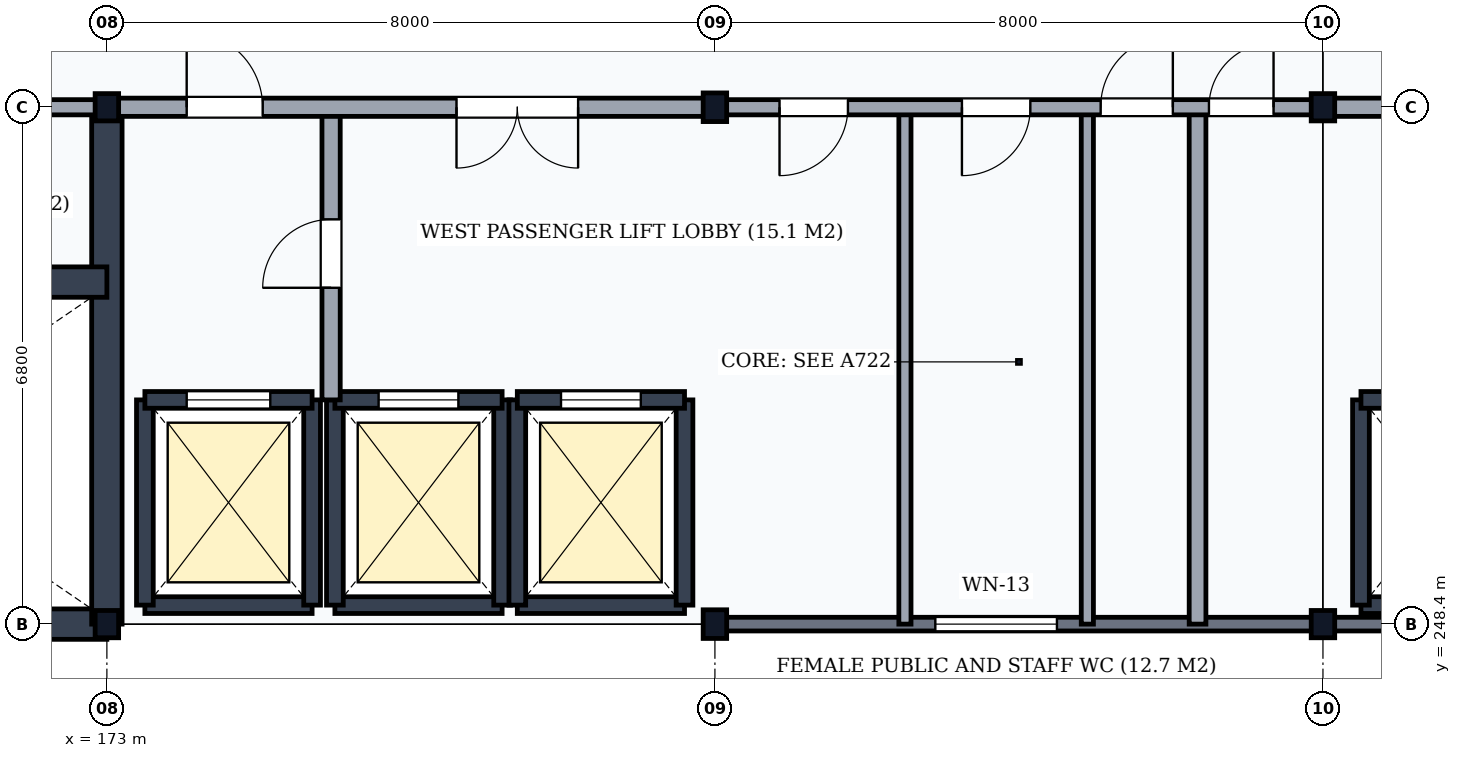
"""IFC4 building model, lengths in metres.
Left out: names, types, materials, properties, quantities, classifications, styles, units other than length and angle.
Written with IfcOpenShell. Run it as: python <this file> out.ifc"""

import sys

from ifc_helpers import new_model, si_unit, direction, frame, frame_2d, origin, origin_2d, place, context, subcontext, project, spatial, rectangle, i_section, extrude, element, fill, save


model = new_model("IFC4")
c1 = context("Model", 3, precision=1e-05, world=origin(), true_north=direction((0.0, 1.0)))
c2 = subcontext(c1, "Body", "Model", "MODEL_VIEW")
j1 = project(units=[si_unit("LENGTHUNIT", "METRE"), si_unit("PLANEANGLEUNIT", "RADIAN")], contexts=[c1])
p1 = place(None, origin())
s1 = spatial("IfcSite", under=j1, at=p1, CompositionType="ELEMENT")
p2 = place(p1, origin())
s2 = spatial("IfcBuilding", under=s1, at=p2, CompositionType="ELEMENT")
p3 = place(p2, frame((0.0, 0.0, 47.7)))
s3 = spatial("IfcBuildingStorey", under=s2, at=p3, CompositionType="ELEMENT", Elevation=47.7)
for number, where, z_axis, x_axis in (
    (1, (173.0, 248.4, 0.0), (0.0, 0.0, 1.0), (1.0, 0.0, 0.0)),
    (2, (173.0, 255.2, 0.0), (0.0, 0.0, 1.0), (1.0, 0.0, 0.0)),
):
    element("IfcColumn", number, at=place(p3, frame(where, z_axis=z_axis, x_axis=x_axis)), inside=s3, PredefinedType="COLUMN", context=c2, shape_type="SweptSolid", body=[
        extrude(i_section(OverallWidth=0.309, OverallDepth=0.359, WebThickness=0.021, FlangeThickness=0.04, FilletRadius=0.027, at=origin_2d()), origin(), (0.0, 0.0, 1.0), 3.9),
    ])
for number, where, z_axis, x_axis in (
    (3, (181.0, 248.4, 0.0), (0.0, 0.0, 1.0), (1.0, 0.0, 0.0)),
    (4, (181.0, 255.2, 0.0), (0.0, 0.0, 1.0), (1.0, 0.0, 0.0)),
):
    element("IfcColumn", number, at=place(p3, frame(where, z_axis=z_axis, x_axis=x_axis)), inside=s3, PredefinedType="COLUMN", context=c2, shape_type="SweptSolid", body=[
        extrude(i_section(OverallWidth=0.309, OverallDepth=0.377, WebThickness=0.021, FlangeThickness=0.04, FilletRadius=0.027, at=origin_2d()), origin(), (0.0, 0.0, 1.0), 3.9),
    ])
for number, where, z_axis, x_axis in (
    (5, (189.0, 248.4, 0.0), (0.0, 0.0, 1.0), (1.0, 0.0, 0.0)),
    (6, (189.0, 255.2, 0.0), (0.0, 0.0, 1.0), (1.0, 0.0, 0.0)),
):
    element("IfcColumn", number, at=place(p3, frame(where, z_axis=z_axis, x_axis=x_axis)), inside=s3, PredefinedType="COLUMN", context=c2, shape_type="SweptSolid", body=[
        extrude(i_section(OverallWidth=0.309, OverallDepth=0.359, WebThickness=0.021, FlangeThickness=0.04, FilletRadius=0.027, at=origin_2d()), origin(), (0.0, 0.0, 1.0), 3.9),
    ])
p4 = place(p3, frame((181.006, 248.4, 0.0), z_axis=(0.0, 0.0, 1.0), x_axis=(1.0, 0.0, 0.0)))
e7 = element("IfcWall", 7, at=p4, inside=s3, PredefinedType="SOLIDWALL", context=c2, shape_type="SweptSolid", body=[
    extrude(rectangle(XDim=7.988, YDim=0.18, at=frame_2d((3.994, 0.0))), origin(), (0.0, 0.0, 1.0), 3.298),
])
p5 = place(p4, frame((2.894, 0.0, 0.95)))
e8 = element("IfcOpeningElement", 8, at=p5, cuts=e7, PredefinedType="OPENING", context=c2, shape_type="SweptSolid", body=[
    extrude(rectangle(XDim=1.6, YDim=2.0, at=frame_2d((0.8, 1.0))), frame((0.0, 0.105, 0.0), z_axis=(0.0, -1.0, 0.0), x_axis=(1.0, 0.0, 0.0)), (0.0, 0.0, 1.0), 0.21),
])
p6 = place(p3, frame((189.006, 248.4, 0.0), z_axis=(0.0, 0.0, 1.0), x_axis=(1.0, 0.0, 0.0)))
e9 = element("IfcWall", 9, at=p6, inside=s3, PredefinedType="SOLIDWALL", context=c2, shape_type="SweptSolid", body=[
    extrude(rectangle(XDim=7.988, YDim=0.18, at=frame_2d((3.994, 0.0))), origin(), (0.0, 0.0, 1.0), 3.298),
])
p7 = place(p3, frame((165.0, 248.4, 0.0), z_axis=(0.0, 0.0, 1.0), x_axis=(1.0, 0.0, 0.0)))
e10 = element("IfcWall", 10, at=p7, inside=s3, PredefinedType="SHEAR", context=c2, shape_type="SweptSolid", body=[
    extrude(rectangle(XDim=8.0, YDim=0.4, at=frame_2d((4.0, 0.0))), origin(), (0.0, 0.0, 1.0), 3.61),
])
p8 = place(p3, frame((173.0, 248.4, 0.0), z_axis=(0.0, 0.0, 1.0), x_axis=(0.0, 1.0, 0.0)))
e11 = element("IfcWall", 11, at=p8, inside=s3, PredefinedType="SHEAR", context=c2, shape_type="SweptSolid", body=[
    extrude(rectangle(XDim=6.8, YDim=0.4, at=frame_2d((3.4, 0.0))), origin(), (0.0, 0.0, 1.0), 3.61),
])
p9 = place(p3, frame((165.0, 252.9, 0.0), z_axis=(0.0, 0.0, 1.0), x_axis=(1.0, 0.0, 0.0)))
e12 = element("IfcWall", 12, at=p9, inside=s3, PredefinedType="SHEAR", context=c2, shape_type="SweptSolid", body=[
    extrude(rectangle(XDim=8.0, YDim=0.4, at=frame_2d((4.0, 0.0))), origin(), (0.0, 0.0, 1.0), 3.61),
])
p10 = place(p9, frame((0.3, 0.0, 0.0)))
e13 = element("IfcOpeningElement", 13, at=p10, cuts=e12, PredefinedType="OPENING", context=c2, shape_type="SweptSolid", body=[
    extrude(rectangle(XDim=1.15, YDim=2.15, at=frame_2d((0.575, 1.075))), frame((0.0, 0.215, 0.0), z_axis=(0.0, -1.0, 0.0), x_axis=(1.0, 0.0, 0.0)), (0.0, 0.0, 1.0), 0.43),
])
p11 = place(p3, frame((165.0, 255.2, 0.0), z_axis=(0.0, 0.0, 1.0), x_axis=(1.0, 0.0, 0.0)))
e14 = element("IfcWall", 14, at=p11, inside=s3, PredefinedType="PARTITIONING", context=c2, shape_type="SweptSolid", body=[
    extrude(rectangle(XDim=8.0, YDim=0.2, at=frame_2d((4.0, 0.0))), origin(), (0.0, 0.0, 1.0), 3.108),
])
p12 = place(p11, frame((3.275, 0.0, 0.0)))
e15 = element("IfcOpeningElement", 15, at=p12, cuts=e14, PredefinedType="OPENING", context=c2, shape_type="SweptSolid", body=[
    extrude(rectangle(XDim=1.45, YDim=2.2, at=frame_2d((0.725, 1.1))), frame((0.0, 0.115, 0.0), z_axis=(0.0, -1.0, 0.0), x_axis=(1.0, 0.0, 0.0)), (0.0, 0.0, 1.0), 0.23),
])
p13 = place(p3, frame((173.5, 248.65, 0.0), z_axis=(0.0, 0.0, 1.0), x_axis=(1.0, 0.0, 0.0)))
e16 = element("IfcWall", 16, at=p13, inside=s3, PredefinedType="SHEAR", context=c2, shape_type="SweptSolid", body=[
    extrude(rectangle(XDim=2.2, YDim=0.22, at=frame_2d((1.1, 0.0))), origin(), (0.0, 0.0, 1.0), 3.61),
])
for number, where, z_axis, x_axis in (
    (17, (173.5, 248.65, 0.0), (0.0, 0.0, 1.0), (0.0, 1.0, 0.0)),
    (18, (175.7, 248.65, 0.0), (0.0, 0.0, 1.0), (0.0, 1.0, 0.0)),
):
    element("IfcWall", number, at=place(p3, frame(where, z_axis=z_axis, x_axis=x_axis)), inside=s3, PredefinedType="SHEAR", context=c2, shape_type="SweptSolid", body=[
        extrude(rectangle(XDim=2.7, YDim=0.22, at=frame_2d((1.35, 0.0))), origin(), (0.0, 0.0, 1.0), 3.61),
    ])
p14 = place(p3, frame((173.5, 251.35, 0.0), z_axis=(0.0, 0.0, 1.0), x_axis=(1.0, 0.0, 0.0)))
e19 = element("IfcWall", 19, at=p14, inside=s3, PredefinedType="SHEAR", context=c2, shape_type="SweptSolid", body=[
    extrude(rectangle(XDim=2.2, YDim=0.22, at=frame_2d((1.1, 0.0))), origin(), (0.0, 0.0, 1.0), 3.61),
])
p15 = place(p14, frame((0.55, 0.0, 0.0)))
e20 = element("IfcOpeningElement", 20, at=p15, cuts=e19, PredefinedType="OPENING", context=c2, shape_type="SweptSolid", body=[
    extrude(rectangle(XDim=1.1, YDim=2.15, at=frame_2d((0.55, 1.075))), frame((0.0, 0.125, 0.0), z_axis=(0.0, -1.0, 0.0), x_axis=(1.0, 0.0, 0.0)), (0.0, 0.0, 1.0), 0.25),
])
p16 = place(p3, frame((176.0, 248.65, 0.0), z_axis=(0.0, 0.0, 1.0), x_axis=(1.0, 0.0, 0.0)))
e21 = element("IfcWall", 21, at=p16, inside=s3, PredefinedType="SHEAR", context=c2, shape_type="SweptSolid", body=[
    extrude(rectangle(XDim=2.2, YDim=0.22, at=frame_2d((1.1, 0.0))), origin(), (0.0, 0.0, 1.0), 3.61),
])
for number, where, z_axis, x_axis in (
    (22, (176.0, 248.65, 0.0), (0.0, 0.0, 1.0), (0.0, 1.0, 0.0)),
    (23, (178.2, 248.65, 0.0), (0.0, 0.0, 1.0), (0.0, 1.0, 0.0)),
):
    element("IfcWall", number, at=place(p3, frame(where, z_axis=z_axis, x_axis=x_axis)), inside=s3, PredefinedType="SHEAR", context=c2, shape_type="SweptSolid", body=[
        extrude(rectangle(XDim=2.7, YDim=0.22, at=frame_2d((1.35, 0.0))), origin(), (0.0, 0.0, 1.0), 3.61),
    ])
p17 = place(p3, frame((176.0, 251.35, 0.0), z_axis=(0.0, 0.0, 1.0), x_axis=(1.0, 0.0, 0.0)))
e24 = element("IfcWall", 24, at=p17, inside=s3, PredefinedType="SHEAR", context=c2, shape_type="SweptSolid", body=[
    extrude(rectangle(XDim=2.2, YDim=0.22, at=frame_2d((1.1, 0.0))), origin(), (0.0, 0.0, 1.0), 3.61),
])
p18 = place(p17, frame((0.575, 0.0, 0.0)))
e25 = element("IfcOpeningElement", 25, at=p18, cuts=e24, PredefinedType="OPENING", context=c2, shape_type="SweptSolid", body=[
    extrude(rectangle(XDim=1.05, YDim=2.15, at=frame_2d((0.525, 1.075))), frame((0.0, 0.125, 0.0), z_axis=(0.0, -1.0, 0.0), x_axis=(1.0, 0.0, 0.0)), (0.0, 0.0, 1.0), 0.25),
])
p19 = place(p3, frame((178.4, 248.65, 0.0), z_axis=(0.0, 0.0, 1.0), x_axis=(1.0, 0.0, 0.0)))
e26 = element("IfcWall", 26, at=p19, inside=s3, PredefinedType="SHEAR", context=c2, shape_type="SweptSolid", body=[
    extrude(rectangle(XDim=2.2, YDim=0.22, at=frame_2d((1.1, 0.0))), origin(), (0.0, 0.0, 1.0), 3.61),
])
for number, where, z_axis, x_axis in (
    (27, (178.4, 248.65, 0.0), (0.0, 0.0, 1.0), (0.0, 1.0, 0.0)),
    (28, (180.6, 248.65, 0.0), (0.0, 0.0, 1.0), (0.0, 1.0, 0.0)),
):
    element("IfcWall", number, at=place(p3, frame(where, z_axis=z_axis, x_axis=x_axis)), inside=s3, PredefinedType="SHEAR", context=c2, shape_type="SweptSolid", body=[
        extrude(rectangle(XDim=2.7, YDim=0.22, at=frame_2d((1.35, 0.0))), origin(), (0.0, 0.0, 1.0), 3.61),
    ])
p20 = place(p3, frame((178.4, 251.35, 0.0), z_axis=(0.0, 0.0, 1.0), x_axis=(1.0, 0.0, 0.0)))
e29 = element("IfcWall", 29, at=p20, inside=s3, PredefinedType="SHEAR", context=c2, shape_type="SweptSolid", body=[
    extrude(rectangle(XDim=2.2, YDim=0.22, at=frame_2d((1.1, 0.0))), origin(), (0.0, 0.0, 1.0), 3.61),
])
p21 = place(p20, frame((0.575, 0.0, 0.0)))
e30 = element("IfcOpeningElement", 30, at=p21, cuts=e29, PredefinedType="OPENING", context=c2, shape_type="SweptSolid", body=[
    extrude(rectangle(XDim=1.05, YDim=2.15, at=frame_2d((0.525, 1.075))), frame((0.0, 0.125, 0.0), z_axis=(0.0, -1.0, 0.0), x_axis=(1.0, 0.0, 0.0)), (0.0, 0.0, 1.0), 0.25),
])
p22 = place(p3, frame((189.5, 248.65, 0.0), z_axis=(0.0, 0.0, 1.0), x_axis=(1.0, 0.0, 0.0)))
e31 = element("IfcWall", 31, at=p22, inside=s3, PredefinedType="SHEAR", context=c2, shape_type="SweptSolid", body=[
    extrude(rectangle(XDim=2.2, YDim=0.22, at=frame_2d((1.1, 0.0))), origin(), (0.0, 0.0, 1.0), 3.61),
])
p23 = place(p3, frame((189.5, 248.65, 0.0), z_axis=(0.0, 0.0, 1.0), x_axis=(0.0, 1.0, 0.0)))
e32 = element("IfcWall", 32, at=p23, inside=s3, PredefinedType="SHEAR", context=c2, shape_type="SweptSolid", body=[
    extrude(rectangle(XDim=2.7, YDim=0.22, at=frame_2d((1.35, 0.0))), origin(), (0.0, 0.0, 1.0), 3.61),
])
p24 = place(p3, frame((189.5, 251.35, 0.0), z_axis=(0.0, 0.0, 1.0), x_axis=(1.0, 0.0, 0.0)))
e33 = element("IfcWall", 33, at=p24, inside=s3, PredefinedType="SHEAR", context=c2, shape_type="SweptSolid", body=[
    extrude(rectangle(XDim=2.2, YDim=0.22, at=frame_2d((1.1, 0.0))), origin(), (0.0, 0.0, 1.0), 3.61),
])
p25 = place(p24, frame((0.55, 0.0, 0.0)))
e34 = element("IfcOpeningElement", 34, at=p25, cuts=e33, PredefinedType="OPENING", context=c2, shape_type="SweptSolid", body=[
    extrude(rectangle(XDim=1.1, YDim=2.15, at=frame_2d((0.55, 1.075))), frame((0.0, 0.125, 0.0), z_axis=(0.0, -1.0, 0.0), x_axis=(1.0, 0.0, 0.0)), (0.0, 0.0, 1.0), 0.25),
])
p26 = place(p3, frame((175.95, 251.35, 0.0), z_axis=(0.0, 0.0, 1.0), x_axis=(0.0, 1.0, 0.0)))
e35 = element("IfcWall", 35, at=p26, inside=s3, PredefinedType="PARTITIONING", context=c2, shape_type="SweptSolid", body=[
    extrude(rectangle(XDim=3.85, YDim=0.24, at=frame_2d((1.925, 0.0))), origin(), (0.0, 0.0, 1.0), 3.61),
])
p27 = place(p26, frame((1.475, 0.0, 0.0)))
e36 = element("IfcOpeningElement", 36, at=p27, cuts=e35, PredefinedType="OPENING", context=c2, shape_type="SweptSolid", body=[
    extrude(rectangle(XDim=0.9, YDim=2.1, at=frame_2d((0.45, 1.05))), frame((0.0, 0.135, 0.0), z_axis=(0.0, -1.0, 0.0), x_axis=(1.0, 0.0, 0.0)), (0.0, 0.0, 1.0), 0.27),
])
for number, where, z_axis, x_axis in (
    (37, (183.5, 248.4, 0.0), (0.0, 0.0, 1.0), (0.0, 1.0, 0.0)),
    (38, (185.9, 248.4, 0.0), (0.0, 0.0, 1.0), (0.0, 1.0, 0.0)),
):
    element("IfcWall", number, at=place(p3, frame(where, z_axis=z_axis, x_axis=x_axis)), inside=s3, PredefinedType="PARTITIONING", context=c2, shape_type="SweptSolid", body=[
        extrude(rectangle(XDim=6.8, YDim=0.16, at=frame_2d((3.4, 0.0))), origin(), (0.0, 0.0, 1.0), 3.61),
    ])
p28 = place(p3, frame((187.35, 248.4, 0.0), z_axis=(0.0, 0.0, 1.0), x_axis=(0.0, 1.0, 0.0)))
e39 = element("IfcWall", 39, at=p28, inside=s3, PredefinedType="PARTITIONING", context=c2, shape_type="SweptSolid", body=[
    extrude(rectangle(XDim=6.8, YDim=0.22, at=frame_2d((3.4, 0.0))), origin(), (0.0, 0.0, 1.0), 3.61),
])
p29 = place(p3, frame((173.0, 255.2, 0.0), z_axis=(0.0, 0.0, 1.0), x_axis=(1.0, 0.0, 0.0)))
e40 = element("IfcWall", 40, at=p29, inside=s3, PredefinedType="PARTITIONING", context=c2, shape_type="SweptSolid", body=[
    extrude(rectangle(XDim=8.0, YDim=0.24, at=frame_2d((4.0, 0.0))), origin(), (0.0, 0.0, 1.0), 3.108),
])
p30 = place(p29, frame((1.05, 0.0, 0.0)))
e41 = element("IfcOpeningElement", 41, at=p30, cuts=e40, PredefinedType="OPENING", context=c2, shape_type="SweptSolid", body=[
    extrude(rectangle(XDim=1.0, YDim=2.1, at=frame_2d((0.5, 1.05))), frame((0.0, 0.135, 0.0), z_axis=(0.0, -1.0, 0.0), x_axis=(1.0, 0.0, 0.0)), (0.0, 0.0, 1.0), 0.27),
])
p31 = place(p29, frame((4.6, 0.0, 0.0)))
e42 = element("IfcOpeningElement", 42, at=p31, cuts=e40, PredefinedType="OPENING", context=c2, shape_type="SweptSolid", body=[
    extrude(rectangle(XDim=1.6, YDim=2.25, at=frame_2d((0.8, 1.125))), frame((0.0, 0.135, 0.0), z_axis=(0.0, -1.0, 0.0), x_axis=(1.0, 0.0, 0.0)), (0.0, 0.0, 1.0), 0.27),
])
p32 = place(p3, frame((181.0, 255.2, 0.0), z_axis=(0.0, 0.0, 1.0), x_axis=(1.0, 0.0, 0.0)))
e43 = element("IfcWall", 43, at=p32, inside=s3, PredefinedType="PARTITIONING", context=c2, shape_type="SweptSolid", body=[
    extrude(rectangle(XDim=8.0, YDim=0.2, at=frame_2d((4.0, 0.0))), origin(), (0.0, 0.0, 1.0), 3.108),
])
p33 = place(p32, frame((0.85, 0.0, 0.0)))
e44 = element("IfcOpeningElement", 44, at=p33, cuts=e43, PredefinedType="OPENING", context=c2, shape_type="SweptSolid", body=[
    extrude(rectangle(XDim=0.9, YDim=2.1, at=frame_2d((0.45, 1.05))), frame((0.0, 0.115, 0.0), z_axis=(0.0, -1.0, 0.0), x_axis=(1.0, 0.0, 0.0)), (0.0, 0.0, 1.0), 0.23),
])
p34 = place(p32, frame((3.25, 0.0, 0.0)))
e45 = element("IfcOpeningElement", 45, at=p34, cuts=e43, PredefinedType="OPENING", context=c2, shape_type="SweptSolid", body=[
    extrude(rectangle(XDim=0.9, YDim=2.1, at=frame_2d((0.45, 1.05))), frame((0.0, 0.115, 0.0), z_axis=(0.0, -1.0, 0.0), x_axis=(1.0, 0.0, 0.0)), (0.0, 0.0, 1.0), 0.23),
])
p35 = place(p32, frame((5.075, 0.0, 0.0)))
e46 = element("IfcOpeningElement", 46, at=p35, cuts=e43, PredefinedType="OPENING", context=c2, shape_type="SweptSolid", body=[
    extrude(rectangle(XDim=0.95, YDim=2.1, at=frame_2d((0.475, 1.05))), frame((0.0, 0.115, 0.0), z_axis=(0.0, -1.0, 0.0), x_axis=(1.0, 0.0, 0.0)), (0.0, 0.0, 1.0), 0.23),
])
p36 = place(p32, frame((6.5, 0.0, 0.0)))
e47 = element("IfcOpeningElement", 47, at=p36, cuts=e43, PredefinedType="OPENING", context=c2, shape_type="SweptSolid", body=[
    extrude(rectangle(XDim=0.85, YDim=2.1, at=frame_2d((0.425, 1.05))), frame((0.0, 0.115, 0.0), z_axis=(0.0, -1.0, 0.0), x_axis=(1.0, 0.0, 0.0)), (0.0, 0.0, 1.0), 0.23),
])
p37 = place(p3, frame((189.0, 255.2, 0.0), z_axis=(0.0, 0.0, 1.0), x_axis=(1.0, 0.0, 0.0)))
e48 = element("IfcWall", 48, at=p37, inside=s3, PredefinedType="PARTITIONING", context=c2, shape_type="SweptSolid", body=[
    extrude(rectangle(XDim=8.0, YDim=0.24, at=frame_2d((4.0, 0.0))), origin(), (0.0, 0.0, 1.0), 3.108),
])
p38 = place(p37, frame((1.05, 0.0, 0.0)))
e49 = element("IfcOpeningElement", 49, at=p38, cuts=e48, PredefinedType="OPENING", context=c2, shape_type="SweptSolid", body=[
    extrude(rectangle(XDim=1.0, YDim=2.1, at=frame_2d((0.5, 1.05))), frame((0.0, 0.135, 0.0), z_axis=(0.0, -1.0, 0.0), x_axis=(1.0, 0.0, 0.0)), (0.0, 0.0, 1.0), 0.27),
])
p39 = place(p37, frame((3.6, 0.0, 0.0)))
e50 = element("IfcOpeningElement", 50, at=p39, cuts=e48, PredefinedType="OPENING", context=c2, shape_type="SweptSolid", body=[
    extrude(rectangle(XDim=1.5, YDim=2.25, at=frame_2d((0.75, 1.125))), frame((0.0, 0.135, 0.0), z_axis=(0.0, -1.0, 0.0), x_axis=(1.0, 0.0, 0.0)), (0.0, 0.0, 1.0), 0.27),
])
p40 = place(p37, frame((6.425, 0.0, 0.0)))
e51 = element("IfcOpeningElement", 51, at=p40, cuts=e48, PredefinedType="OPENING", context=c2, shape_type="SweptSolid", body=[
    extrude(rectangle(XDim=0.85, YDim=2.1, at=frame_2d((0.425, 1.05))), frame((0.0, 0.135, 0.0), z_axis=(0.0, -1.0, 0.0), x_axis=(1.0, 0.0, 0.0)), (0.0, 0.0, 1.0), 0.27),
])
p41 = place(p5, origin())
e52 = element("IfcWindow", 52, at=p41, inside=s3, PartitioningType="SINGLE_PANEL", PredefinedType="WINDOW", context=c2, shape_type="SweptSolid", body=[
    extrude(rectangle(XDim=1.6, YDim=2.0, at=frame_2d((0.8, 1.0))), frame((0.0, 0.03, 0.0), z_axis=(0.0, -1.0, 0.0), x_axis=(1.0, 0.0, 0.0)), (0.0, 0.0, 1.0), 0.06),
])
fill(e8, e52)
p42 = place(p15, origin())
e53 = element("IfcDoor", 53, at=p42, inside=s3, OperationType="DOUBLE_DOOR_SLIDING", PredefinedType="USERDEFINED", context=c2, shape_type="SweptSolid", body=[
    extrude(rectangle(XDim=1.1, YDim=2.15, at=frame_2d((0.55, 1.075))), frame((0.0, 0.025, 0.0), z_axis=(0.0, -1.0, 0.0), x_axis=(1.0, 0.0, 0.0)), (0.0, 0.0, 1.0), 0.05),
])
fill(e20, e53)
p43 = place(p18, origin())
e54 = element("IfcDoor", 54, at=p43, inside=s3, OperationType="DOUBLE_DOOR_SLIDING", PredefinedType="USERDEFINED", context=c2, shape_type="SweptSolid", body=[
    extrude(rectangle(XDim=1.05, YDim=2.15, at=frame_2d((0.525, 1.075))), frame((0.0, 0.025, 0.0), z_axis=(0.0, -1.0, 0.0), x_axis=(1.0, 0.0, 0.0)), (0.0, 0.0, 1.0), 0.05),
])
fill(e25, e54)
p44 = place(p21, origin())
e55 = element("IfcDoor", 55, at=p44, inside=s3, OperationType="DOUBLE_DOOR_SLIDING", PredefinedType="USERDEFINED", context=c2, shape_type="SweptSolid", body=[
    extrude(rectangle(XDim=1.05, YDim=2.15, at=frame_2d((0.525, 1.075))), frame((0.0, 0.025, 0.0), z_axis=(0.0, -1.0, 0.0), x_axis=(1.0, 0.0, 0.0)), (0.0, 0.0, 1.0), 0.05),
])
fill(e30, e55)
p45 = place(p27, origin())
e56 = element("IfcDoor", 56, at=p45, inside=s3, OperationType="SINGLE_SWING_LEFT", PredefinedType="DOOR", context=c2, shape_type="SweptSolid", body=[
    extrude(rectangle(XDim=0.9, YDim=2.1, at=frame_2d((0.45, 1.05))), frame((0.0, 0.025, 0.0), z_axis=(0.0, -1.0, 0.0), x_axis=(1.0, 0.0, 0.0)), (0.0, 0.0, 1.0), 0.05),
])
fill(e36, e56)
p46 = place(p30, origin())
e57 = element("IfcDoor", 57, at=p46, inside=s3, OperationType="SINGLE_SWING_LEFT", PredefinedType="DOOR", context=c2, shape_type="SweptSolid", body=[
    extrude(rectangle(XDim=1.0, YDim=2.1, at=frame_2d((0.5, 1.05))), frame((0.0, 0.025, 0.0), z_axis=(0.0, -1.0, 0.0), x_axis=(1.0, 0.0, 0.0)), (0.0, 0.0, 1.0), 0.05),
])
fill(e41, e57)
p47 = place(p31, frame((1.6, 0.0, 0.0), z_axis=(0.0, 0.0, 1.0), x_axis=(-1.0, 0.0, 0.0)))
e58 = element("IfcDoor", 58, at=p47, inside=s3, OperationType="DOUBLE_DOOR_SINGLE_SWING", PredefinedType="DOOR", context=c2, shape_type="SweptSolid", body=[
    extrude(rectangle(XDim=1.6, YDim=2.25, at=frame_2d((0.8, 1.125))), frame((0.0, 0.025, 0.0), z_axis=(0.0, -1.0, 0.0), x_axis=(1.0, 0.0, 0.0)), (0.0, 0.0, 1.0), 0.05),
])
fill(e42, e58)
p48 = place(p33, frame((0.9, 0.0, 0.0), z_axis=(0.0, 0.0, 1.0), x_axis=(-1.0, 0.0, 0.0)))
e59 = element("IfcDoor", 59, at=p48, inside=s3, OperationType="SINGLE_SWING_RIGHT", PredefinedType="DOOR", context=c2, shape_type="SweptSolid", body=[
    extrude(rectangle(XDim=0.9, YDim=2.1, at=frame_2d((0.45, 1.05))), frame((0.0, 0.025, 0.0), z_axis=(0.0, -1.0, 0.0), x_axis=(1.0, 0.0, 0.0)), (0.0, 0.0, 1.0), 0.05),
])
fill(e44, e59)
p49 = place(p34, frame((0.9, 0.0, 0.0), z_axis=(0.0, 0.0, 1.0), x_axis=(-1.0, 0.0, 0.0)))
e60 = element("IfcDoor", 60, at=p49, inside=s3, OperationType="SINGLE_SWING_RIGHT", PredefinedType="DOOR", context=c2, shape_type="SweptSolid", body=[
    extrude(rectangle(XDim=0.9, YDim=2.1, at=frame_2d((0.45, 1.05))), frame((0.0, 0.025, 0.0), z_axis=(0.0, -1.0, 0.0), x_axis=(1.0, 0.0, 0.0)), (0.0, 0.0, 1.0), 0.05),
])
fill(e45, e60)
p50 = place(p35, frame((0.95, 0.0, 0.0), z_axis=(0.0, 0.0, 1.0), x_axis=(-1.0, 0.0, 0.0)))
e61 = element("IfcDoor", 61, at=p50, inside=s3, OperationType="SINGLE_SWING_LEFT", PredefinedType="DOOR", context=c2, shape_type="SweptSolid", body=[
    extrude(rectangle(XDim=0.95, YDim=2.1, at=frame_2d((0.475, 1.05))), frame((0.0, 0.025, 0.0), z_axis=(0.0, -1.0, 0.0), x_axis=(1.0, 0.0, 0.0)), (0.0, 0.0, 1.0), 0.05),
])
fill(e46, e61)
p51 = place(p36, frame((0.85, 0.0, 0.0), z_axis=(0.0, 0.0, 1.0), x_axis=(-1.0, 0.0, 0.0)))
e62 = element("IfcDoor", 62, at=p51, inside=s3, OperationType="SINGLE_SWING_LEFT", PredefinedType="DOOR", context=c2, shape_type="SweptSolid", body=[
    extrude(rectangle(XDim=0.85, YDim=2.1, at=frame_2d((0.425, 1.05))), frame((0.0, 0.025, 0.0), z_axis=(0.0, -1.0, 0.0), x_axis=(1.0, 0.0, 0.0)), (0.0, 0.0, 1.0), 0.05),
])
fill(e47, e62)
save(model, sys.argv[1])
